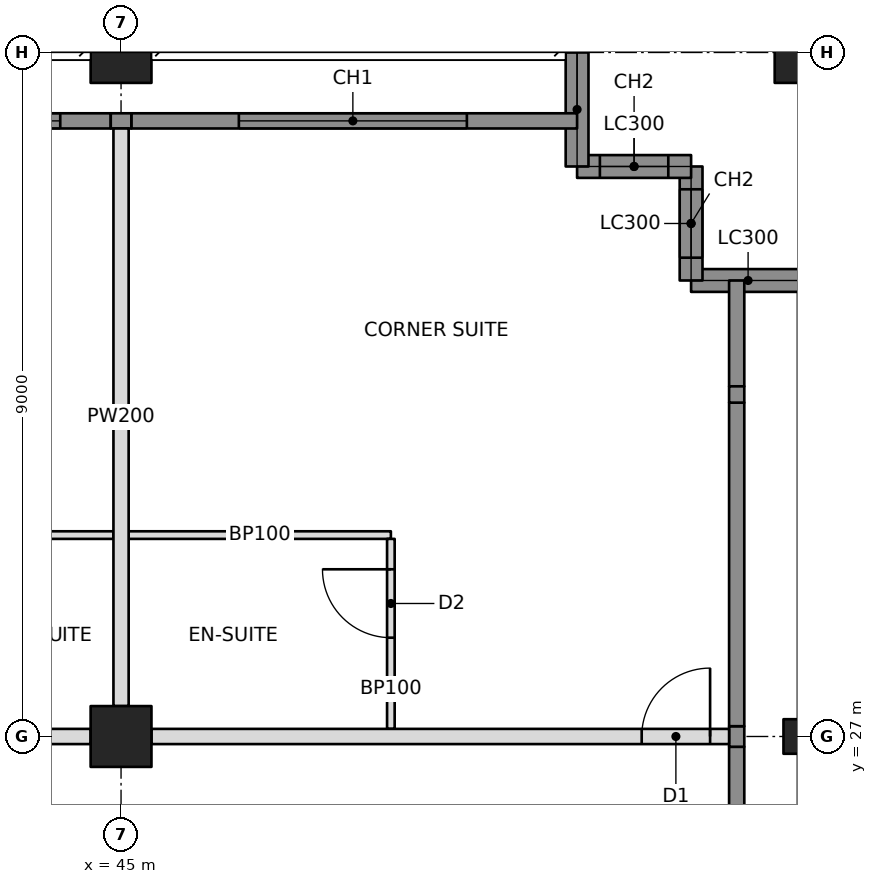
"""IFC4 building model, lengths in metres.
Left out: names, types, materials, properties, quantities, classifications, styles, units other than length and angle.
Written with IfcOpenShell. Run it as: python <this file> out.ifc"""

import sys

from ifc_helpers import new_model, si_unit, direction, frame, frame_2d, origin, origin_2d, place, context, subcontext, project, spatial, rectangle, hollow_rectangle, i_section, extrude, element, fill, save


model = new_model("IFC4")
c1 = context("Model", 3, precision=1e-05, world=origin(), true_north=direction((0.0, 1.0)))
c2 = subcontext(c1, "Body", "Model", "MODEL_VIEW")
j1 = project(units=[si_unit("LENGTHUNIT", "METRE"), si_unit("PLANEANGLEUNIT", "RADIAN")], contexts=[c1])
p1 = place(None, origin())
s1 = spatial("IfcSite", under=j1, at=p1, CompositionType="ELEMENT")
p2 = place(p1, origin())
s2 = spatial("IfcBuilding", under=s1, at=p2, CompositionType="ELEMENT")
p3 = place(p2, frame((0.0, 0.0, 82.4)))
s3 = spatial("IfcBuildingStorey", under=s2, at=p3, CompositionType="ELEMENT", Elevation=82.4)
p4 = place(p3, frame((45.0, 27.0, 0.0), z_axis=(0.0, 0.0, 1.0), x_axis=(0.0, 1.0, 0.0)))
e1 = element("IfcColumn", 1, at=p4, inside=s3, PredefinedType="COLUMN", context=c2, shape_type="SweptSolid", body=[
    extrude(hollow_rectangle(XDim=0.8, YDim=0.8, WallThickness=0.09, at=origin_2d()), origin(), (0.0, 0.0, 1.0), 3.4),
])
p5 = place(p3, frame((45.0, 36.0, 0.0), z_axis=(0.0, 0.0, 1.0), x_axis=(1.0, 0.0, 0.0)))
e2 = element("IfcColumn", 2, at=p5, inside=s3, PredefinedType="COLUMN", context=c2, shape_type="SweptSolid", body=[
    extrude(hollow_rectangle(XDim=0.8, YDim=0.8, WallThickness=0.07, at=origin_2d()), origin(), (0.0, 0.0, 1.0), 3.4),
])
p6 = place(p3, frame((54.0, 27.0, 0.0), z_axis=(0.0, 0.0, 1.0), x_axis=(0.0, 1.0, 0.0)))
e3 = element("IfcColumn", 3, at=p6, inside=s3, PredefinedType="COLUMN", context=c2, shape_type="SweptSolid", body=[
    extrude(i_section(OverallWidth=0.455, OverallDepth=0.569, WebThickness=0.078, FlangeThickness=0.125, at=origin_2d()), origin(), (0.0, 0.0, 1.0), 3.4),
])
p7 = place(p3, frame((54.0, 36.0, 0.0), z_axis=(0.0, 0.0, 1.0), x_axis=(1.0, 0.0, 0.0)))
e4 = element("IfcColumn", 4, at=p7, inside=s3, PredefinedType="COLUMN", context=c2, shape_type="SweptSolid", body=[
    extrude(hollow_rectangle(XDim=0.8, YDim=0.8, WallThickness=0.07, at=origin_2d()), origin(), (0.0, 0.0, 1.0), 3.4),
])
p8 = place(p3, frame((54.0, 33.0, 0.0), z_axis=(0.0, 0.0, 1.0), x_axis=(-1.0, 0.0, 0.0)))
e5 = element("IfcWall", 5, at=p8, inside=s3, PredefinedType="SOLIDWALL", context=c2, shape_type="SweptSolid", body=[
    extrude(rectangle(XDim=1.5, YDim=0.3, at=frame_2d((0.75, 0.0))), origin(), (0.0, 0.0, 1.0), 2.42),
])
p9 = place(p3, frame((52.5, 33.0, 0.0), z_axis=(0.0, 0.0, 1.0), x_axis=(0.0, 1.0, 0.0)))
e6 = element("IfcWall", 6, at=p9, inside=s3, PredefinedType="SOLIDWALL", context=c2, shape_type="SweptSolid", body=[
    extrude(rectangle(XDim=1.5, YDim=0.3, at=frame_2d((0.75, 0.0))), origin(), (0.0, 0.0, 1.0), 3.2),
])
p10 = place(p9, frame((0.3, 0.0, 0.6)))
e7 = element("IfcOpeningElement", 7, at=p10, cuts=e6, PredefinedType="OPENING", context=c2, shape_type="SweptSolid", body=[
    extrude(rectangle(XDim=0.9, YDim=2.2, at=frame_2d((0.45, 1.1))), frame((0.0, 0.16, 0.0), z_axis=(0.0, -1.0, 0.0), x_axis=(1.0, 0.0, 0.0)), (0.0, 0.0, 1.0), 0.32),
])
p11 = place(p3, frame((52.5, 34.5, 0.0), z_axis=(0.0, 0.0, 1.0), x_axis=(-1.0, 0.0, 0.0)))
e8 = element("IfcWall", 8, at=p11, inside=s3, PredefinedType="SOLIDWALL", context=c2, shape_type="SweptSolid", body=[
    extrude(rectangle(XDim=1.5, YDim=0.3, at=frame_2d((0.75, 0.0))), origin(), (0.0, 0.0, 1.0), 3.2),
])
p12 = place(p11, frame((0.3, 0.0, 0.6)))
e9 = element("IfcOpeningElement", 9, at=p12, cuts=e8, PredefinedType="OPENING", context=c2, shape_type="SweptSolid", body=[
    extrude(rectangle(XDim=0.9, YDim=2.2, at=frame_2d((0.45, 1.1))), frame((0.0, 0.16, 0.0), z_axis=(0.0, -1.0, 0.0), x_axis=(1.0, 0.0, 0.0)), (0.0, 0.0, 1.0), 0.32),
])
p13 = place(p3, frame((51.0, 34.5, 0.0), z_axis=(0.0, 0.0, 1.0), x_axis=(0.0, 1.0, 0.0)))
e10 = element("IfcWall", 10, at=p13, inside=s3, PredefinedType="SOLIDWALL", context=c2, shape_type="SweptSolid", body=[
    extrude(rectangle(XDim=1.5, YDim=0.3, at=frame_2d((0.75, 0.0))), origin(), (0.0, 0.0, 1.0), 2.42),
])
p14 = place(p3, frame((36.4, 27.0, 0.0), z_axis=(0.0, 0.0, 1.0), x_axis=(1.0, 0.0, 0.0)))
e11 = element("IfcWall", 11, at=p14, inside=s3, PredefinedType="PARTITIONING", context=c2, shape_type="SweptSolid", body=[
    extrude(rectangle(XDim=8.2, YDim=0.2, at=frame_2d((4.1, 0.0))), origin(), (0.0, 0.0, 1.0), 2.438),
])
p15 = place(p14, frame((2.95, 0.0, 0.0)))
e12 = element("IfcOpeningElement", 12, at=p15, cuts=e11, PredefinedType="OPENING", context=c2, shape_type="SweptSolid", body=[
    extrude(rectangle(XDim=0.9, YDim=2.1, at=frame_2d((0.45, 1.05))), frame((0.0, 0.11, 0.0), z_axis=(0.0, -1.0, 0.0), x_axis=(1.0, 0.0, 0.0)), (0.0, 0.0, 1.0), 0.22),
])
p16 = place(p14, frame((4.35, 0.0, 0.0)))
e13 = element("IfcOpeningElement", 13, at=p16, cuts=e11, PredefinedType="OPENING", context=c2, shape_type="SweptSolid", body=[
    extrude(rectangle(XDim=0.9, YDim=2.1, at=frame_2d((0.45, 1.05))), frame((0.0, 0.11, 0.0), z_axis=(0.0, -1.0, 0.0), x_axis=(1.0, 0.0, 0.0)), (0.0, 0.0, 1.0), 0.22),
])
p17 = place(p3, frame((45.4, 27.0, 0.0), z_axis=(0.0, 0.0, 1.0), x_axis=(1.0, 0.0, 0.0)))
e14 = element("IfcWall", 14, at=p17, inside=s3, PredefinedType="PARTITIONING", context=c2, shape_type="SweptSolid", body=[
    extrude(rectangle(XDim=7.6, YDim=0.2, at=frame_2d((3.8, 0.0))), origin(), (0.0, 0.0, 1.0), 2.438),
])
p18 = place(p17, frame((6.45, 0.0, 0.0)))
e15 = element("IfcOpeningElement", 15, at=p18, cuts=e14, PredefinedType="OPENING", context=c2, shape_type="SweptSolid", body=[
    extrude(rectangle(XDim=0.9, YDim=2.1, at=frame_2d((0.45, 1.05))), frame((0.0, 0.11, 0.0), z_axis=(0.0, -1.0, 0.0), x_axis=(1.0, 0.0, 0.0)), (0.0, 0.0, 1.0), 0.22),
])
p19 = place(p3, frame((45.0, 27.4, 0.0), z_axis=(0.0, 0.0, 1.0), x_axis=(0.0, 1.0, 0.0)))
e16 = element("IfcWall", 16, at=p19, inside=s3, PredefinedType="PARTITIONING", context=c2, shape_type="SweptSolid", body=[
    extrude(rectangle(XDim=7.6, YDim=0.2, at=frame_2d((3.8, 0.0))), origin(), (0.0, 0.0, 1.0), 2.438),
])
p20 = place(p3, frame((41.95, 29.65, 0.0), z_axis=(0.0, 0.0, 1.0), x_axis=(1.0, 0.0, 0.0)))
e17 = element("IfcWall", 17, at=p20, inside=s3, PredefinedType="PARTITIONING", context=c2, shape_type="SweptSolid", body=[
    extrude(rectangle(XDim=2.95, YDim=0.1, at=frame_2d((1.475, 0.0))), origin(), (0.0, 0.0, 1.0), 2.438),
])
p21 = place(p3, frame((45.1, 29.65, 0.0), z_axis=(0.0, 0.0, 1.0), x_axis=(1.0, 0.0, 0.0)))
e18 = element("IfcWall", 18, at=p21, inside=s3, PredefinedType="PARTITIONING", context=c2, shape_type="SweptSolid", body=[
    extrude(rectangle(XDim=3.45, YDim=0.1, at=frame_2d((1.725, 0.0))), origin(), (0.0, 0.0, 1.0), 2.438),
])
p22 = place(p3, frame((48.55, 27.1, 0.0), z_axis=(0.0, 0.0, 1.0), x_axis=(0.0, 1.0, 0.0)))
e19 = element("IfcWall", 19, at=p22, inside=s3, PredefinedType="PARTITIONING", context=c2, shape_type="SweptSolid", body=[
    extrude(rectangle(XDim=2.5, YDim=0.1, at=frame_2d((1.25, 0.0))), origin(), (0.0, 0.0, 1.0), 2.438),
])
p23 = place(p22, frame((1.2, 0.0, 0.0)))
e20 = element("IfcOpeningElement", 20, at=p23, cuts=e19, PredefinedType="OPENING", context=c2, shape_type="SweptSolid", body=[
    extrude(rectangle(XDim=0.9, YDim=2.1, at=frame_2d((0.45, 1.05))), frame((0.0, 0.06, 0.0), z_axis=(0.0, -1.0, 0.0), x_axis=(1.0, 0.0, 0.0)), (0.0, 0.0, 1.0), 0.12),
])
p24 = place(p3, frame((36.135, 35.1, 0.0), z_axis=(0.0, 0.0, 1.0), x_axis=(1.0, 0.0, 0.0)))
e21 = element("IfcWall", 21, at=p24, inside=s3, PredefinedType="SOLIDWALL", context=c2, shape_type="SweptSolid", body=[
    extrude(rectangle(XDim=8.729, YDim=0.2, at=frame_2d((4.365, 0.0))), origin(), (0.0, 0.0, 1.0), 3.2),
])
p25 = place(p24, frame((0.665, 0.0, 0.6)))
e22 = element("IfcOpeningElement", 22, at=p25, cuts=e21, PredefinedType="OPENING", context=c2, shape_type="SweptSolid", body=[
    extrude(rectangle(XDim=3.0, YDim=2.2, at=frame_2d((1.5, 1.1))), frame((0.0, 0.11, 0.0), z_axis=(0.0, -1.0, 0.0), x_axis=(1.0, 0.0, 0.0)), (0.0, 0.0, 1.0), 0.22),
])
p26 = place(p24, frame((5.065, 0.0, 0.6)))
e23 = element("IfcOpeningElement", 23, at=p26, cuts=e21, PredefinedType="OPENING", context=c2, shape_type="SweptSolid", body=[
    extrude(rectangle(XDim=3.0, YDim=2.2, at=frame_2d((1.5, 1.1))), frame((0.0, 0.11, 0.0), z_axis=(0.0, -1.0, 0.0), x_axis=(1.0, 0.0, 0.0)), (0.0, 0.0, 1.0), 0.22),
])
p27 = place(p3, frame((44.865, 35.1, 0.0), z_axis=(0.0, 0.0, 1.0), x_axis=(1.0, 0.0, 0.0)))
e24 = element("IfcWall", 24, at=p27, inside=s3, PredefinedType="SOLIDWALL", context=c2, shape_type="SweptSolid", body=[
    extrude(rectangle(XDim=0.271, YDim=0.2, at=frame_2d((0.135, 0.0))), origin(), (0.0, 0.0, 1.0), 2.438),
])
p28 = place(p3, frame((45.135, 35.1, 0.0), z_axis=(0.0, 0.0, 1.0), x_axis=(1.0, 0.0, 0.0)))
e25 = element("IfcWall", 25, at=p28, inside=s3, PredefinedType="SOLIDWALL", context=c2, shape_type="SweptSolid", body=[
    extrude(rectangle(XDim=5.865, YDim=0.2, at=frame_2d((2.932, 0.0))), origin(), (0.0, 0.0, 1.0), 3.2),
])
p29 = place(p28, frame((1.415, 0.0, 0.6)))
e26 = element("IfcOpeningElement", 26, at=p29, cuts=e25, PredefinedType="OPENING", context=c2, shape_type="SweptSolid", body=[
    extrude(rectangle(XDim=3.0, YDim=2.2, at=frame_2d((1.5, 1.1))), frame((0.0, 0.11, 0.0), z_axis=(0.0, -1.0, 0.0), x_axis=(1.0, 0.0, 0.0)), (0.0, 0.0, 1.0), 0.22),
])
p30 = place(p3, frame((53.1, 18.135, 0.0), z_axis=(0.0, 0.0, 1.0), x_axis=(0.0, 1.0, 0.0)))
e27 = element("IfcWall", 27, at=p30, inside=s3, PredefinedType="SOLIDWALL", context=c2, shape_type="SweptSolid", body=[
    extrude(rectangle(XDim=8.729, YDim=0.2, at=frame_2d((4.365, 0.0))), origin(), (0.0, 0.0, 1.0), 3.2),
])
p31 = place(p30, frame((0.215, 0.0, 0.6)))
e28 = element("IfcOpeningElement", 28, at=p31, cuts=e27, PredefinedType="OPENING", context=c2, shape_type="SweptSolid", body=[
    extrude(rectangle(XDim=3.0, YDim=2.2, at=frame_2d((1.5, 1.1))), frame((0.0, 0.11, 0.0), z_axis=(0.0, -1.0, 0.0), x_axis=(1.0, 0.0, 0.0)), (0.0, 0.0, 1.0), 0.22),
])
p32 = place(p30, frame((3.715, 0.0, 0.6)))
e29 = element("IfcOpeningElement", 29, at=p32, cuts=e27, PredefinedType="OPENING", context=c2, shape_type="SweptSolid", body=[
    extrude(rectangle(XDim=3.0, YDim=2.2, at=frame_2d((1.5, 1.1))), frame((0.0, 0.11, 0.0), z_axis=(0.0, -1.0, 0.0), x_axis=(1.0, 0.0, 0.0)), (0.0, 0.0, 1.0), 0.22),
])
p33 = place(p3, frame((53.1, 26.865, 0.0), z_axis=(0.0, 0.0, 1.0), x_axis=(0.0, 1.0, 0.0)))
e30 = element("IfcWall", 30, at=p33, inside=s3, PredefinedType="SOLIDWALL", context=c2, shape_type="SweptSolid", body=[
    extrude(rectangle(XDim=0.271, YDim=0.2, at=frame_2d((0.135, 0.0))), origin(), (0.0, 0.0, 1.0), 2.438),
])
p34 = place(p3, frame((53.1, 27.135, 0.0), z_axis=(0.0, 0.0, 1.0), x_axis=(0.0, 1.0, 0.0)))
e31 = element("IfcWall", 31, at=p34, inside=s3, PredefinedType="SOLIDWALL", context=c2, shape_type="SweptSolid", body=[
    extrude(rectangle(XDim=4.257, YDim=0.2, at=frame_2d((2.129, 0.0))), origin(), (0.0, 0.0, 1.0), 3.2),
])
p35 = place(p3, frame((53.1, 31.393, 0.0), z_axis=(0.0, 0.0, 1.0), x_axis=(0.0, 1.0, 0.0)))
e32 = element("IfcWall", 32, at=p35, inside=s3, PredefinedType="SOLIDWALL", context=c2, shape_type="SweptSolid", body=[
    extrude(rectangle(XDim=0.215, YDim=0.2, at=frame_2d((0.107, 0.0))), origin(), (0.0, 0.0, 1.0), 2.661),
])
p36 = place(p3, frame((53.1, 31.607, 0.0), z_axis=(0.0, 0.0, 1.0), x_axis=(0.0, 1.0, 0.0)))
e33 = element("IfcWall", 33, at=p36, inside=s3, PredefinedType="SOLIDWALL", context=c2, shape_type="SweptSolid", body=[
    extrude(rectangle(XDim=1.393, YDim=0.2, at=frame_2d((0.696, 0.0))), origin(), (0.0, 0.0, 1.0), 3.2),
])
p37 = place(p10, origin())
e34 = element("IfcWindow", 34, at=p37, inside=s3, PartitioningType="SINGLE_PANEL", PredefinedType="WINDOW", context=c2, shape_type="SweptSolid", body=[
    extrude(rectangle(XDim=0.9, YDim=2.2, at=frame_2d((0.45, 1.1))), frame((0.0, 0.03, 0.0), z_axis=(0.0, -1.0, 0.0), x_axis=(1.0, 0.0, 0.0)), (0.0, 0.0, 1.0), 0.06),
])
fill(e7, e34)
p38 = place(p12, origin())
e35 = element("IfcWindow", 35, at=p38, inside=s3, PartitioningType="SINGLE_PANEL", PredefinedType="WINDOW", context=c2, shape_type="SweptSolid", body=[
    extrude(rectangle(XDim=0.9, YDim=2.2, at=frame_2d((0.45, 1.1))), frame((0.0, 0.03, 0.0), z_axis=(0.0, -1.0, 0.0), x_axis=(1.0, 0.0, 0.0)), (0.0, 0.0, 1.0), 0.06),
])
fill(e9, e35)
p39 = place(p26, origin())
e36 = element("IfcWindow", 36, at=p39, inside=s3, PartitioningType="TRIPLE_PANEL_VERTICAL", PredefinedType="WINDOW", context=c2, shape_type="SweptSolid", body=[
    extrude(rectangle(XDim=3.0, YDim=2.2, at=frame_2d((1.5, 1.1))), frame((0.0, 0.03, 0.0), z_axis=(0.0, -1.0, 0.0), x_axis=(1.0, 0.0, 0.0)), (0.0, 0.0, 1.0), 0.06),
])
fill(e23, e36)
p40 = place(p29, origin())
e37 = element("IfcWindow", 37, at=p40, inside=s3, PartitioningType="TRIPLE_PANEL_VERTICAL", PredefinedType="WINDOW", context=c2, shape_type="SweptSolid", body=[
    extrude(rectangle(XDim=3.0, YDim=2.2, at=frame_2d((1.5, 1.1))), frame((0.0, 0.03, 0.0), z_axis=(0.0, -1.0, 0.0), x_axis=(1.0, 0.0, 0.0)), (0.0, 0.0, 1.0), 0.06),
])
fill(e26, e37)
p41 = place(p23, origin())
e38 = element("IfcDoor", 38, at=p41, inside=s3, OperationType="SINGLE_SWING_RIGHT", PredefinedType="DOOR", context=c2, shape_type="SweptSolid", body=[
    extrude(rectangle(XDim=0.9, YDim=2.1, at=frame_2d((0.45, 1.05))), frame((0.0, 0.025, 0.0), z_axis=(0.0, -1.0, 0.0), x_axis=(1.0, 0.0, 0.0)), (0.0, 0.0, 1.0), 0.05),
])
fill(e20, e38)
p42 = place(p18, origin())
e39 = element("IfcDoor", 39, at=p42, inside=s3, OperationType="SINGLE_SWING_RIGHT", PredefinedType="DOOR", context=c2, shape_type="SweptSolid", body=[
    extrude(rectangle(XDim=0.9, YDim=2.1, at=frame_2d((0.45, 1.05))), frame((0.0, 0.025, 0.0), z_axis=(0.0, -1.0, 0.0), x_axis=(1.0, 0.0, 0.0)), (0.0, 0.0, 1.0), 0.05),
])
fill(e15, e39)
save(model, sys.argv[1])
